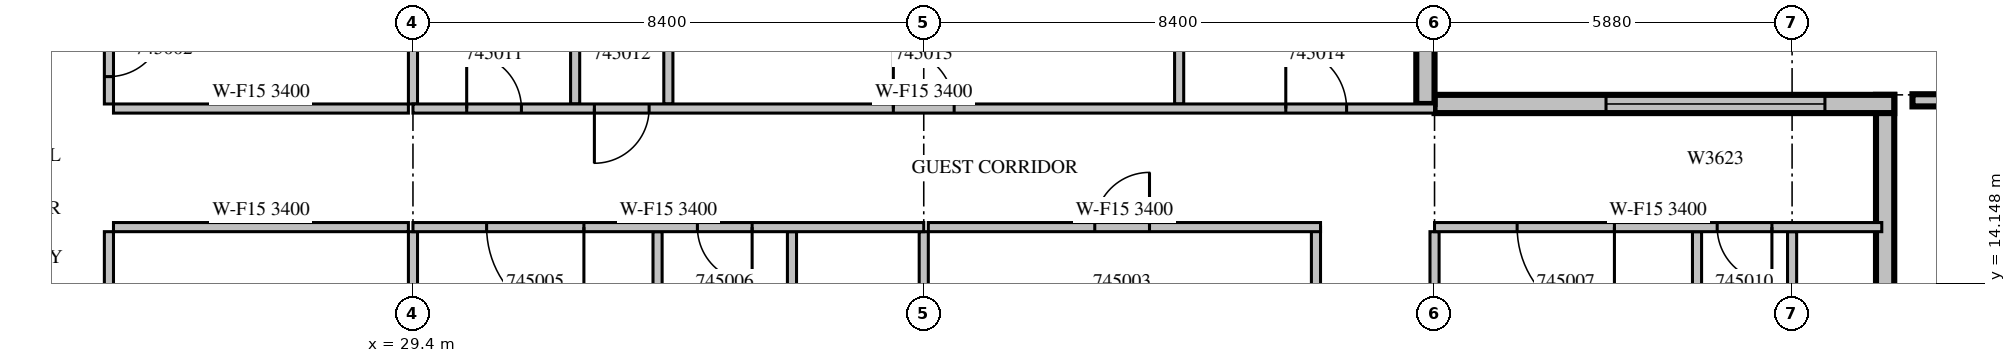
"""IFC4 building model, lengths in metres.
Left out: names, types, materials, properties, quantities, classifications, styles, units other than length and angle.
Written with IfcOpenShell. Run it as: python <this file> out.ifc"""

import sys

from ifc_helpers import new_model, si_unit, direction, frame, frame_2d, origin, place, context, subcontext, project, spatial, rectangle, extrude, source, transform, mapped, element, fill, save


model = new_model("IFC4")
c1 = context("Model", 3, precision=1e-05, world=origin(), true_north=direction((0.0, 1.0)))
c2 = subcontext(c1, "Body", "Model", "MODEL_VIEW")
j1 = project(units=[si_unit("LENGTHUNIT", "METRE"), si_unit("PLANEANGLEUNIT", "RADIAN")], contexts=[c1])
p1 = place(None, origin())
s1 = spatial("IfcSite", under=j1, at=p1, CompositionType="ELEMENT")
p2 = place(p1, origin())
s2 = spatial("IfcBuilding", under=s1, at=p2, CompositionType="ELEMENT")
p3 = place(p2, frame((0.0, 0.0, 204.4)))
s3 = spatial("IfcBuildingStorey", under=s2, at=p3, CompositionType="ELEMENT", Elevation=204.4)
m1 = source(origin(), c2, "Body", "SweptSolid", [
    extrude(rectangle(XDim=6.75, YDim=0.3, at=frame_2d((3.375, 0.0))), origin(), (0.0, 0.0, 1.0), 3.4),
])
p4 = place(p3, frame((53.61, 10.5, 0.0), z_axis=(0.0, 0.0, 1.0), x_axis=(0.0, 1.0, 0.0)))
e1 = element("IfcWall", 1, at=p4, inside=s3, PredefinedType="STANDARD", context=c2, shape_type="MappedRepresentation", body=[
    mapped(m1, transform((0.0, 0.0, 0.0), scale=1.0)),
])
m2 = source(origin(), c2, "Body", "SweptSolid", [
    extrude(rectangle(XDim=1.8, YDim=2.4, at=frame_2d((0.9, 1.2))), frame((0.0, 0.16, 0.0), z_axis=(0.0, -1.0, 0.0), x_axis=(1.0, 0.0, 0.0)), (0.0, 0.0, 1.0), 0.32),
])
p5 = place(p4, frame((0.787, 0.0, 0.0)))
e2 = element("IfcOpeningElement", 2, at=p5, cuts=e1, PredefinedType="OPENING", context=c2, shape_type="MappedRepresentation", body=[
    mapped(m2, transform((0.0, 0.0, 0.0), scale=1.0)),
])
p6 = place(p3, frame((53.76, 17.1, 0.0), z_axis=(0.0, 0.0, 1.0), x_axis=(-1.0, 0.0, 0.0)))
e3 = element("IfcWall", 3, at=p6, inside=s3, PredefinedType="STANDARD", context=c2, shape_type="SweptSolid", body=[
    extrude(rectangle(XDim=7.56, YDim=0.3, at=frame_2d((3.78, 0.0))), origin(), (0.0, 0.0, 1.0), 3.4),
])
m3 = source(origin(), c2, "Body", "SweptSolid", [
    extrude(rectangle(XDim=3.6, YDim=2.3, at=frame_2d((1.8, 1.15))), frame((0.0, 0.16, 0.0), z_axis=(0.0, -1.0, 0.0), x_axis=(1.0, 0.0, 0.0)), (0.0, 0.0, 1.0), 0.32),
])
p7 = place(p6, frame((1.14, 0.0, 0.6)))
e4 = element("IfcOpeningElement", 4, at=p7, cuts=e3, PredefinedType="OPENING", context=c2, shape_type="MappedRepresentation", body=[
    mapped(m3, transform((0.0, 0.0, 0.0), scale=1.0)),
])
m4 = source(origin(), c2, "Body", "SweptSolid", [
    extrude(rectangle(XDim=3.0, YDim=0.3, at=frame_2d((1.5, 0.0))), origin(), (0.0, 0.0, 1.0), 3.4),
])
p8 = place(p3, frame((46.05, 17.1, 0.0), z_axis=(0.0, 0.0, 1.0), x_axis=(0.0, 1.0, 0.0)))
e5 = element("IfcWall", 5, at=p8, inside=s3, PredefinedType="STANDARD", context=c2, shape_type="MappedRepresentation", body=[
    mapped(m4, transform((0.0, 0.0, 0.0), scale=1.0)),
])
m5 = source(origin(), c2, "Body", "SweptSolid", [
    extrude(rectangle(XDim=1.2, YDim=2.3, at=frame_2d((0.6, 1.15))), frame((0.0, 0.16, 0.0), z_axis=(0.0, -1.0, 0.0), x_axis=(1.0, 0.0, 0.0)), (0.0, 0.0, 1.0), 0.32),
])
p9 = place(p8, frame((1.425, 0.0, 0.6)))
e6 = element("IfcOpeningElement", 6, at=p9, cuts=e5, PredefinedType="OPENING", context=c2, shape_type="MappedRepresentation", body=[
    mapped(m5, transform((0.0, 0.0, 0.0), scale=1.0)),
])
m6 = source(origin(), c2, "Body", "SweptSolid", [
    extrude(rectangle(XDim=5.49, YDim=0.2, at=frame_2d((2.745, 0.0))), origin(), (0.0, 0.0, 1.0), 1.1),
])
p10 = place(p3, frame((54.06, 17.16, 0.0), z_axis=(0.0, 0.0, 1.0), x_axis=(1.0, 0.0, 0.0)))
e7 = element("IfcWall", 7, at=p10, inside=s3, PredefinedType="PARAPET", context=c2, shape_type="MappedRepresentation", body=[
    mapped(m6, transform((0.0, 0.0, 0.0), scale=1.0)),
])
m7 = source(origin(), c2, "Body", "SweptSolid", [
    extrude(rectangle(XDim=4.295, YDim=0.15, at=frame_2d((2.147, 0.0))), origin(), (0.0, 0.0, 1.0), 3.4),
])
p11 = place(p3, frame((24.4, 15.0, 0.0), z_axis=(0.0, 0.0, 1.0), x_axis=(0.0, -1.0, 0.0)))
e8 = element("IfcWall", 8, at=p11, inside=s3, PredefinedType="PARTITIONING", context=c2, shape_type="MappedRepresentation", body=[
    mapped(m7, transform((0.0, 0.0, 0.0), scale=1.0)),
])
m8 = source(origin(), c2, "Body", "SweptSolid", [
    extrude(rectangle(XDim=0.9, YDim=2.1, at=frame_2d((0.45, 1.05))), frame((0.0, 0.085, 0.0), z_axis=(0.0, -1.0, 0.0), x_axis=(1.0, 0.0, 0.0)), (0.0, 0.0, 1.0), 0.17),
])
p12 = place(p11, frame((1.113, 0.0, 0.0)))
e9 = element("IfcOpeningElement", 9, at=p12, cuts=e8, PredefinedType="OPENING", context=c2, shape_type="MappedRepresentation", body=[
    mapped(m8, transform((0.0, 0.0, 0.0), scale=1.0)),
])
m9 = source(origin(), c2, "Body", "SweptSolid", [
    extrude(rectangle(XDim=3.6, YDim=0.15, at=frame_2d((1.8, 0.0))), origin(), (0.0, 0.0, 1.0), 3.4),
])
p13 = place(p3, frame((24.4, 20.7, 0.0), z_axis=(0.0, 0.0, 1.0), x_axis=(0.0, -1.0, 0.0)))
e10 = element("IfcWall", 10, at=p13, inside=s3, PredefinedType="PARTITIONING", context=c2, shape_type="MappedRepresentation", body=[
    mapped(m9, transform((0.0, 0.0, 0.0), scale=1.0)),
])
p14 = place(p13, frame((2.25, 0.0, 0.0)))
e11 = element("IfcOpeningElement", 11, at=p14, cuts=e10, PredefinedType="OPENING", context=c2, shape_type="MappedRepresentation", body=[
    mapped(m8, transform((0.0, 0.0, 0.0), scale=1.0)),
])
m10 = source(origin(), c2, "Body", "SweptSolid", [
    extrude(rectangle(XDim=4.85, YDim=0.15, at=frame_2d((2.425, 0.0))), origin(), (0.0, 0.0, 1.0), 3.4),
])
for number, where, z_axis, x_axis in (
    (12, (29.325, 15.075, 0.0), (0.0, 0.0, 1.0), (-1.0, 0.0, 0.0)),
    (13, (24.475, 17.025, 0.0), (0.0, 0.0, 1.0), (1.0, 0.0, 0.0)),
):
    element("IfcWall", number, at=place(p3, frame(where, z_axis=z_axis, x_axis=x_axis)), inside=s3, PredefinedType="PARTITIONING", context=c2, shape_type="MappedRepresentation", body=[
        mapped(m10, transform((0.0, 0.0, 0.0), scale=1.0)),
    ])
m11 = source(origin(), c2, "Body", "SweptSolid", [
    extrude(rectangle(XDim=4.051, YDim=0.15, at=frame_2d((2.026, 0.0))), origin(), (0.0, 0.0, 1.0), 3.4),
])
p15 = place(p3, frame((29.4, 10.949, 0.0), z_axis=(0.0, 0.0, 1.0), x_axis=(0.0, 1.0, 0.0)))
e14 = element("IfcWall", 14, at=p15, inside=s3, PredefinedType="PARTITIONING", context=c2, shape_type="MappedRepresentation", body=[
    mapped(m11, transform((0.0, 0.0, 0.0), scale=1.0)),
])
m12 = source(origin(), c2, "Body", "SweptSolid", [
    extrude(rectangle(XDim=3.001, YDim=0.15, at=frame_2d((1.5, 0.0))), origin(), (0.0, 0.0, 1.0), 3.4),
])
p16 = place(p3, frame((29.4, 17.1, 0.0), z_axis=(0.0, 0.0, 1.0), x_axis=(0.0, 1.0, 0.0)))
e15 = element("IfcWall", 15, at=p16, inside=s3, PredefinedType="PARTITIONING", context=c2, shape_type="MappedRepresentation", body=[
    mapped(m12, transform((0.0, 0.0, 0.0), scale=1.0)),
])
m13 = source(origin(), c2, "Body", "SweptSolid", [
    extrude(rectangle(XDim=2.775, YDim=0.15, at=frame_2d((1.387, 0.0))), origin(), (0.0, 0.0, 1.0), 3.4),
])
p17 = place(p3, frame((44.25, 12.3, 0.0), z_axis=(0.0, 0.0, 1.0), x_axis=(0.0, 1.0, 0.0)))
e16 = element("IfcWall", 16, at=p17, inside=s3, PredefinedType="PARTITIONING", context=c2, shape_type="MappedRepresentation", body=[
    mapped(m13, transform((0.0, 0.0, 0.0), scale=1.0)),
])
m14 = source(origin(), c2, "Body", "SweptSolid", [
    extrude(rectangle(XDim=6.45, YDim=0.15, at=frame_2d((3.225, 0.0))), origin(), (0.0, 0.0, 1.0), 3.4),
])
p18 = place(p3, frame((44.325, 15.075, 0.0), z_axis=(0.0, 0.0, 1.0), x_axis=(-1.0, 0.0, 0.0)))
e17 = element("IfcWall", 17, at=p18, inside=s3, PredefinedType="PARTITIONING", context=c2, shape_type="MappedRepresentation", body=[
    mapped(m14, transform((0.0, 0.0, 0.0), scale=1.0)),
])
p19 = place(p18, frame((2.812, 0.0, 0.0)))
e18 = element("IfcOpeningElement", 18, at=p19, cuts=e17, PredefinedType="OPENING", context=c2, shape_type="MappedRepresentation", body=[
    mapped(m8, transform((0.0, 0.0, 0.0), scale=1.0)),
])
p20 = place(p3, frame((33.422, 10.705, 0.0), z_axis=(0.0, 0.0, 1.0), x_axis=(0.0, 1.0, 0.0)))
e19 = element("IfcWall", 19, at=p20, inside=s3, PredefinedType="PARTITIONING", context=c2, shape_type="MappedRepresentation", body=[
    mapped(m7, transform((0.0, 0.0, 0.0), scale=1.0)),
])
p21 = place(p3, frame((35.633, 10.705, 0.0), z_axis=(0.0, 0.0, 1.0), x_axis=(0.0, 1.0, 0.0)))
e20 = element("IfcWall", 20, at=p21, inside=s3, PredefinedType="PARTITIONING", context=c2, shape_type="MappedRepresentation", body=[
    mapped(m7, transform((0.0, 0.0, 0.0), scale=1.0)),
])
p22 = place(p21, frame((1.698, 0.0, 0.0)))
e21 = element("IfcOpeningElement", 21, at=p22, cuts=e20, PredefinedType="OPENING", context=c2, shape_type="MappedRepresentation", body=[
    mapped(m8, transform((0.0, 0.0, 0.0), scale=1.0)),
])
p23 = place(p3, frame((37.8, 10.949, 0.0), z_axis=(0.0, 0.0, 1.0), x_axis=(0.0, 1.0, 0.0)))
e22 = element("IfcWall", 22, at=p23, inside=s3, PredefinedType="PARTITIONING", context=c2, shape_type="MappedRepresentation", body=[
    mapped(m11, transform((0.0, 0.0, 0.0), scale=1.0)),
])
m15 = source(origin(), c2, "Body", "SweptSolid", [
    extrude(rectangle(XDim=3.9, YDim=0.15, at=frame_2d((1.95, 0.0))), origin(), (0.0, 0.0, 1.0), 3.4),
])
p24 = place(p3, frame((50.517, 11.1, 0.0), z_axis=(0.0, 0.0, 1.0), x_axis=(0.0, 1.0, 0.0)))
e23 = element("IfcWall", 23, at=p24, inside=s3, PredefinedType="PARTITIONING", context=c2, shape_type="MappedRepresentation", body=[
    mapped(m15, transform((0.0, 0.0, 0.0), scale=1.0)),
])
p25 = place(p3, frame((52.08, 11.1, 0.0), z_axis=(0.0, 0.0, 1.0), x_axis=(0.0, 1.0, 0.0)))
e24 = element("IfcWall", 24, at=p25, inside=s3, PredefinedType="PARTITIONING", context=c2, shape_type="MappedRepresentation", body=[
    mapped(m15, transform((0.0, 0.0, 0.0), scale=1.0)),
])
p26 = place(p25, frame((1.5, 0.0, 0.0)))
e25 = element("IfcOpeningElement", 25, at=p26, cuts=e24, PredefinedType="OPENING", context=c2, shape_type="MappedRepresentation", body=[
    mapped(m8, transform((0.0, 0.0, 0.0), scale=1.0)),
])
p27 = place(p3, frame((46.2, 11.1, 0.0), z_axis=(0.0, 0.0, 1.0), x_axis=(0.0, 1.0, 0.0)))
e26 = element("IfcWall", 26, at=p27, inside=s3, PredefinedType="PARTITIONING", context=c2, shape_type="MappedRepresentation", body=[
    mapped(m15, transform((0.0, 0.0, 0.0), scale=1.0)),
])
for number, where, z_axis, x_axis in (
    (27, (32.067, 20.7, 0.0), (0.0, 0.0, 1.0), (0.0, -1.0, 0.0)),
    (28, (33.6, 17.1, 0.0), (0.0, 0.0, 1.0), (0.0, 1.0, 0.0)),
    (29, (42.0, 17.1, 0.0), (0.0, 0.0, 1.0), (0.0, 1.0, 0.0)),
):
    element("IfcWall", number, at=place(p3, frame(where, z_axis=z_axis, x_axis=x_axis)), inside=s3, PredefinedType="PARTITIONING", context=c2, shape_type="MappedRepresentation", body=[
        mapped(m9, transform((0.0, 0.0, 0.0), scale=1.0)),
    ])
m16 = source(origin(), c2, "Body", "SweptSolid", [
    extrude(rectangle(XDim=8.4, YDim=0.15, at=frame_2d((4.2, 0.0))), origin(), (0.0, 0.0, 1.0), 3.4),
])
p28 = place(p3, frame((37.8, 15.075, 0.0), z_axis=(0.0, 0.0, 1.0), x_axis=(-1.0, 0.0, 0.0)))
e30 = element("IfcWall", 30, at=p28, inside=s3, PredefinedType="PARTITIONING", context=c2, shape_type="MappedRepresentation", body=[
    mapped(m16, transform((0.0, 0.0, 0.0), scale=1.0)),
])
m17 = source(origin(), c2, "Body", "SweptSolid", [
    extrude(rectangle(XDim=1.6, YDim=2.1, at=frame_2d((0.8, 1.05))), frame((0.0, 0.085, 0.0), z_axis=(0.0, -1.0, 0.0), x_axis=(1.0, 0.0, 0.0)), (0.0, 0.0, 1.0), 0.17),
])
p29 = place(p28, frame((5.589, 0.0, 0.0)))
e31 = element("IfcOpeningElement", 31, at=p29, cuts=e30, PredefinedType="OPENING", context=c2, shape_type="MappedRepresentation", body=[
    mapped(m17, transform((0.0, 0.0, 0.0), scale=1.0)),
])
p30 = place(p28, frame((2.822, 0.0, 0.0)))
e32 = element("IfcOpeningElement", 32, at=p30, cuts=e30, PredefinedType="OPENING", context=c2, shape_type="MappedRepresentation", body=[
    mapped(m8, transform((0.0, 0.0, 0.0), scale=1.0)),
])
m18 = source(origin(), c2, "Body", "SweptSolid", [
    extrude(rectangle(XDim=7.355, YDim=0.15, at=frame_2d((3.678, 0.0))), origin(), (0.0, 0.0, 1.0), 3.4),
])
p31 = place(p3, frame((53.555, 15.075, 0.0), z_axis=(0.0, 0.0, 1.0), x_axis=(-1.0, 0.0, 0.0)))
e33 = element("IfcWall", 33, at=p31, inside=s3, PredefinedType="PARTITIONING", context=c2, shape_type="MappedRepresentation", body=[
    mapped(m18, transform((0.0, 0.0, 0.0), scale=1.0)),
])
p32 = place(p31, frame((4.397, 0.0, 0.0)))
e34 = element("IfcOpeningElement", 34, at=p32, cuts=e33, PredefinedType="OPENING", context=c2, shape_type="MappedRepresentation", body=[
    mapped(m17, transform((0.0, 0.0, 0.0), scale=1.0)),
])
p33 = place(p31, frame((1.807, 0.0, 0.0)))
e35 = element("IfcOpeningElement", 35, at=p33, cuts=e33, PredefinedType="OPENING", context=c2, shape_type="MappedRepresentation", body=[
    mapped(m8, transform((0.0, 0.0, 0.0), scale=1.0)),
])
p34 = place(p3, frame((29.4, 17.025, 0.0), z_axis=(0.0, 0.0, 1.0), x_axis=(1.0, 0.0, 0.0)))
e36 = element("IfcWall", 36, at=p34, inside=s3, PredefinedType="PARTITIONING", context=c2, shape_type="SweptSolid", body=[
    extrude(rectangle(XDim=16.8, YDim=0.15, at=frame_2d((8.4, 0.0))), origin(), (0.0, 0.0, 1.0), 3.4),
])
p35 = place(p34, frame((0.883, 0.0, 0.0)))
e37 = element("IfcOpeningElement", 37, at=p35, cuts=e36, PredefinedType="OPENING", context=c2, shape_type="MappedRepresentation", body=[
    mapped(m8, transform((0.0, 0.0, 0.0), scale=1.0)),
])
p36 = place(p34, frame((2.983, 0.0, 0.0)))
e38 = element("IfcOpeningElement", 38, at=p36, cuts=e36, PredefinedType="OPENING", context=c2, shape_type="MappedRepresentation", body=[
    mapped(m8, transform((0.0, 0.0, 0.0), scale=1.0)),
])
m19 = source(origin(), c2, "Body", "SweptSolid", [
    extrude(rectangle(XDim=1.0, YDim=2.1, at=frame_2d((0.5, 1.05))), frame((0.0, 0.085, 0.0), z_axis=(0.0, -1.0, 0.0), x_axis=(1.0, 0.0, 0.0)), (0.0, 0.0, 1.0), 0.17),
])
p37 = place(p34, frame((7.9, 0.0, 0.0)))
e39 = element("IfcOpeningElement", 39, at=p37, cuts=e36, PredefinedType="OPENING", context=c2, shape_type="MappedRepresentation", body=[
    mapped(m19, transform((0.0, 0.0, 0.0), scale=1.0)),
])
p38 = place(p34, frame((14.354, 0.0, 0.0)))
e40 = element("IfcOpeningElement", 40, at=p38, cuts=e36, PredefinedType="OPENING", context=c2, shape_type="MappedRepresentation", body=[
    mapped(m19, transform((0.0, 0.0, 0.0), scale=1.0)),
])
m20 = source(origin(), c2, "Body", "SweptSolid", [
    extrude(rectangle(XDim=3.6, YDim=2.3, at=frame_2d((1.8, 1.15))), frame((0.0, 0.03, 0.0), z_axis=(0.0, -1.0, 0.0), x_axis=(1.0, 0.0, 0.0)), (0.0, 0.0, 1.0), 0.06),
])
p39 = place(p7, origin())
e41 = element("IfcWindow", 41, at=p39, inside=s3, PartitioningType="SINGLE_PANEL", PredefinedType="WINDOW", context=c2, shape_type="MappedRepresentation", body=[
    mapped(m20, transform((0.0, 0.0, 0.0), scale=1.0)),
])
fill(e4, e41)
m21 = source(origin(), c2, "Body", "SweptSolid", [
    extrude(rectangle(XDim=0.9, YDim=2.1, at=frame_2d((0.45, 1.05))), frame((0.0, 0.025, 0.0), z_axis=(0.0, -1.0, 0.0), x_axis=(1.0, 0.0, 0.0)), (0.0, 0.0, 1.0), 0.05),
])
p40 = place(p14, origin())
e42 = element("IfcDoor", 42, at=p40, inside=s3, OperationType="SINGLE_SWING_LEFT", PredefinedType="DOOR", context=c2, shape_type="MappedRepresentation", body=[
    mapped(m21, transform((0.0, 0.0, 0.0), scale=1.0)),
])
fill(e11, e42)
p41 = place(p19, origin())
e43 = element("IfcDoor", 43, at=p41, inside=s3, OperationType="SINGLE_SWING_RIGHT", PredefinedType="DOOR", context=c2, shape_type="MappedRepresentation", body=[
    mapped(m21, transform((0.0, 0.0, 0.0), scale=1.0)),
])
fill(e18, e43)
m22 = source(origin(), c2, "Body", "SweptSolid", [
    extrude(rectangle(XDim=1.6, YDim=2.1, at=frame_2d((0.8, 1.05))), frame((0.0, 0.025, 0.0), z_axis=(0.0, -1.0, 0.0), x_axis=(1.0, 0.0, 0.0)), (0.0, 0.0, 1.0), 0.05),
])
p42 = place(p29, origin())
e44 = element("IfcDoor", 44, at=p42, inside=s3, OperationType="SINGLE_SWING_LEFT", PredefinedType="DOOR", context=c2, shape_type="MappedRepresentation", body=[
    mapped(m22, transform((0.0, 0.0, 0.0), scale=1.0)),
])
fill(e31, e44)
p43 = place(p30, origin())
e45 = element("IfcDoor", 45, at=p43, inside=s3, OperationType="SINGLE_SWING_LEFT", PredefinedType="DOOR", context=c2, shape_type="MappedRepresentation", body=[
    mapped(m21, transform((0.0, 0.0, 0.0), scale=1.0)),
])
fill(e32, e45)
p44 = place(p32, origin())
e46 = element("IfcDoor", 46, at=p44, inside=s3, OperationType="SINGLE_SWING_LEFT", PredefinedType="DOOR", context=c2, shape_type="MappedRepresentation", body=[
    mapped(m22, transform((0.0, 0.0, 0.0), scale=1.0)),
])
fill(e34, e46)
p45 = place(p33, origin())
e47 = element("IfcDoor", 47, at=p45, inside=s3, OperationType="SINGLE_SWING_LEFT", PredefinedType="DOOR", context=c2, shape_type="MappedRepresentation", body=[
    mapped(m21, transform((0.0, 0.0, 0.0), scale=1.0)),
])
fill(e35, e47)
p46 = place(p35, origin())
e48 = element("IfcDoor", 48, at=p46, inside=s3, OperationType="SINGLE_SWING_LEFT", PredefinedType="DOOR", context=c2, shape_type="MappedRepresentation", body=[
    mapped(m21, transform((0.0, 0.0, 0.0), scale=1.0)),
])
fill(e37, e48)
p47 = place(p36, origin())
e49 = element("IfcDoor", 49, at=p47, inside=s3, OperationType="SINGLE_SWING_RIGHT", PredefinedType="DOOR", context=c2, shape_type="MappedRepresentation", body=[
    mapped(m21, transform((0.0, 0.0, 0.0), scale=1.0)),
])
fill(e38, e49)
m23 = source(origin(), c2, "Body", "SweptSolid", [
    extrude(rectangle(XDim=1.0, YDim=2.1, at=frame_2d((0.5, 1.05))), frame((0.0, 0.025, 0.0), z_axis=(0.0, -1.0, 0.0), x_axis=(1.0, 0.0, 0.0)), (0.0, 0.0, 1.0), 0.05),
])
p48 = place(p37, origin())
e50 = element("IfcDoor", 50, at=p48, inside=s3, OperationType="SINGLE_SWING_LEFT", PredefinedType="DOOR", context=c2, shape_type="MappedRepresentation", body=[
    mapped(m23, transform((0.0, 0.0, 0.0), scale=1.0)),
])
fill(e39, e50)
p49 = place(p38, origin())
e51 = element("IfcDoor", 51, at=p49, inside=s3, OperationType="SINGLE_SWING_LEFT", PredefinedType="DOOR", context=c2, shape_type="MappedRepresentation", body=[
    mapped(m23, transform((0.0, 0.0, 0.0), scale=1.0)),
])
fill(e40, e51)
save(model, sys.argv[1])
